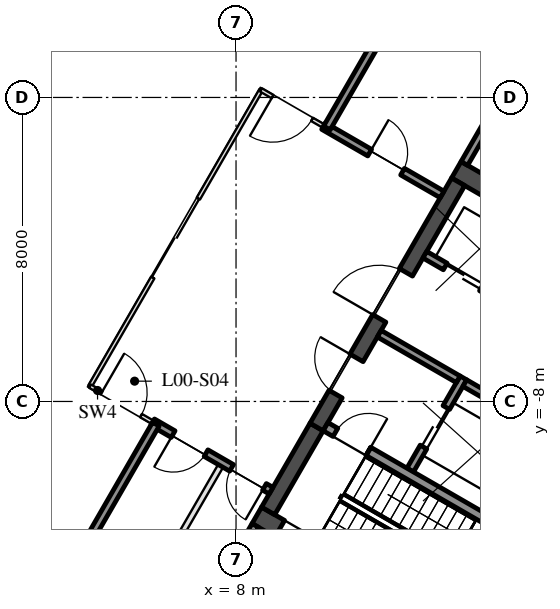
"""IFC4 building model, lengths in metres.
Left out: names, types, materials, properties, quantities, classifications, styles, units other than length and angle.
Written with IfcOpenShell. Run it as: python <this file> out.ifc"""

import sys

from ifc_helpers import new_model, si_unit, direction, frame, frame_2d, origin, origin_2d, place, context, subcontext, project, spatial, rectangle, extrude, element, fill, save


model = new_model("IFC4")
c1 = context("Model", 3, precision=1e-05, world=origin(), true_north=direction((0.0, 1.0)))
c2 = subcontext(c1, "Body", "Model", "MODEL_VIEW")
j1 = project(units=[si_unit("LENGTHUNIT", "METRE"), si_unit("PLANEANGLEUNIT", "RADIAN")], contexts=[c1])
p1 = place(None, origin())
s1 = spatial("IfcSite", under=j1, at=p1, CompositionType="ELEMENT")
p2 = place(p1, origin())
s2 = spatial("IfcBuilding", under=s1, at=p2, CompositionType="ELEMENT")
p3 = place(p2, origin())
s3 = spatial("IfcBuildingStorey", under=s2, at=p3, CompositionType="ELEMENT", Elevation=0.0)
p4 = place(p3, frame((13.797, -1.903, 0.0), z_axis=(0.0, 0.0, 1.0), x_axis=(0.866024264262, -0.500001973705, 0.0)))
e1 = element("IfcWall", 1, at=p4, inside=s3, PredefinedType="SHEAR", context=c2, shape_type="SweptSolid", body=[
    extrude(rectangle(XDim=15.6, YDim=0.5, at=frame_2d((7.8, 0.0))), origin(), (0.0, 0.0, 1.0), 8.7),
])
p5 = place(p3, frame((12.583, -9.805, 0.0), z_axis=(0.0, 0.0, 1.0), x_axis=(0.49994636267, 0.866056369097, 0.0)))
e2 = element("IfcWall", 2, at=p5, inside=s3, PredefinedType="SHEAR", context=c2, shape_type="SweptSolid", body=[
    extrude(rectangle(XDim=2.8, YDim=0.2, at=frame_2d((1.4, 0.0))), origin(), (0.0, 0.0, 1.0), 8.7),
])
p6 = place(p5, frame((0.7, 0.0, 0.0)))
e3 = element("IfcOpeningElement", 3, at=p6, cuts=e2, PredefinedType="OPENING", context=c2, shape_type="SweptSolid", body=[
    extrude(rectangle(XDim=1.2, YDim=2.1, at=frame_2d((0.6, 1.05))), frame((0.0, 0.11, 0.0), z_axis=(0.0, -1.0, 0.0), x_axis=(1.0, 0.0, 0.0)), (0.0, 0.0, 1.0), 0.22),
])
p7 = place(p3, frame((11.768, -6.217, 0.0), z_axis=(0.0, 0.0, 1.0), x_axis=(0.866050077142, -0.499957262057, 0.0)))
e4 = element("IfcWall", 4, at=p7, inside=s3, PredefinedType="SHEAR", context=c2, shape_type="SweptSolid", body=[
    extrude(rectangle(XDim=2.4, YDim=0.2, at=frame_2d((1.2, 0.0))), origin(), (0.0, 0.0, 1.0), 8.7),
])
p8 = place(p3, frame((14.02, -7.517, 0.0), z_axis=(0.0, 0.0, 1.0), x_axis=(0.866034573852, -0.49998411664, 0.0)))
e5 = element("IfcWall", 5, at=p8, inside=s3, PredefinedType="SHEAR", context=c2, shape_type="SweptSolid", body=[
    extrude(rectangle(XDim=2.8, YDim=0.2, at=frame_2d((1.4, 0.0))), origin(), (0.0, 0.0, 1.0), 8.7),
])
p9 = place(p3, frame((12.968, -4.138, 0.0), z_axis=(0.0, 0.0, 1.0), x_axis=(0.866028328073, -0.49999493495, 0.0)))
e6 = element("IfcWall", 6, at=p9, inside=s3, PredefinedType="SHEAR", context=c2, shape_type="SweptSolid", body=[
    extrude(rectangle(XDim=10.16, YDim=0.2, at=frame_2d((5.08, 0.0))), origin(), (0.0, 0.0, 1.0), 8.7),
])
p10 = place(p9, frame((0.62, 0.0, 0.0)))
e7 = element("IfcOpeningElement", 7, at=p10, cuts=e6, PredefinedType="OPENING", context=c2, shape_type="SweptSolid", body=[
    extrude(rectangle(XDim=1.1, YDim=2.1, at=frame_2d((0.55, 1.05))), frame((0.0, 0.11, 0.0), z_axis=(0.0, -1.0, 0.0), x_axis=(1.0, 0.0, 0.0)), (0.0, 0.0, 1.0), 0.22),
])
p11 = place(p9, frame((3.16, 0.0, 0.0)))
e8 = element("IfcOpeningElement", 8, at=p11, cuts=e6, PredefinedType="OPENING", context=c2, shape_type="SweptSolid", body=[
    extrude(rectangle(XDim=1.1, YDim=2.1, at=frame_2d((0.55, 1.05))), frame((0.0, 0.11, 0.0), z_axis=(0.0, -1.0, 0.0), x_axis=(1.0, 0.0, 0.0)), (0.0, 0.0, 1.0), 0.22),
])
p12 = place(p9, frame((5.7, 0.0, 0.0)))
e9 = element("IfcOpeningElement", 9, at=p12, cuts=e6, PredefinedType="OPENING", context=c2, shape_type="SweptSolid", body=[
    extrude(rectangle(XDim=1.1, YDim=2.1, at=frame_2d((0.55, 1.05))), frame((0.0, 0.11, 0.0), z_axis=(0.0, -1.0, 0.0), x_axis=(1.0, 0.0, 0.0)), (0.0, 0.0, 1.0), 0.22),
])
p13 = place(p9, frame((8.24, 0.0, 0.0)))
e10 = element("IfcOpeningElement", 10, at=p13, cuts=e6, PredefinedType="OPENING", context=c2, shape_type="SweptSolid", body=[
    extrude(rectangle(XDim=1.1, YDim=2.1, at=frame_2d((0.55, 1.05))), frame((0.0, 0.11, 0.0), z_axis=(0.0, -1.0, 0.0), x_axis=(1.0, 0.0, 0.0)), (0.0, 0.0, 1.0), 0.22),
])
p14 = place(p3, frame((8.547, -10.997, 0.0), z_axis=(0.0, 0.0, 1.0), x_axis=(0.866033076574, -0.499986710104, 0.0)))
e11 = element("IfcWall", 11, at=p14, inside=s3, PredefinedType="SHEAR", context=c2, shape_type="SweptSolid", body=[
    extrude(rectangle(XDim=1.706, YDim=0.5, at=frame_2d((0.853, 0.0))), origin(), (0.0, 0.0, 1.0), 8.7),
])
p15 = place(p14, frame((0.7, 0.0, 0.0)))
e12 = element("IfcOpeningElement", 12, at=p15, cuts=e11, PredefinedType="OPENING", context=c2, shape_type="SweptSolid", body=[
    extrude(rectangle(XDim=1.0, YDim=2.1, at=frame_2d((0.5, 1.05))), frame((0.0, 0.26, 0.0), z_axis=(0.0, -1.0, 0.0), x_axis=(1.0, 0.0, 0.0)), (0.0, 0.0, 1.0), 0.52),
])
p16 = place(p3, frame((8.845, -10.88, 0.0), z_axis=(0.0, 0.0, 1.0), x_axis=(0.499990435942, 0.866030925526, 0.0)))
e13 = element("IfcWall", 13, at=p16, inside=s3, PredefinedType="SHEAR", context=c2, shape_type="SweptSolid", body=[
    extrude(rectangle(XDim=2.55, YDim=0.4, at=frame_2d((1.275, 0.0))), origin(), (0.0, 0.0, 1.0), 8.7),
])
p17 = place(p3, frame((10.12, -8.672, 0.0), z_axis=(0.0, 0.0, 1.0), x_axis=(0.500008956979, 0.866020232408, 0.0)))
e14 = element("IfcWall", 14, at=p17, inside=s3, PredefinedType="SHEAR", context=c2, shape_type="SweptSolid", body=[
    extrude(rectangle(XDim=7.45, YDim=0.4, at=frame_2d((3.725, 0.0))), origin(), (0.0, 0.0, 1.0), 8.7),
])
p18 = place(p17, frame((1.0, 0.0, 0.0)))
e15 = element("IfcOpeningElement", 15, at=p18, cuts=e14, PredefinedType="OPENING", context=c2, shape_type="SweptSolid", body=[
    extrude(rectangle(XDim=1.1, YDim=2.1, at=frame_2d((0.55, 1.05))), frame((0.0, 0.21, 0.0), z_axis=(0.0, -1.0, 0.0), x_axis=(1.0, 0.0, 0.0)), (0.0, 0.0, 1.0), 0.42),
])
p19 = place(p17, frame((3.3, 0.0, 0.0)))
e16 = element("IfcOpeningElement", 16, at=p19, cuts=e14, PredefinedType="OPENING", context=c2, shape_type="SweptSolid", body=[
    extrude(rectangle(XDim=1.4, YDim=2.1, at=frame_2d((0.7, 1.05))), frame((0.0, 0.21, 0.0), z_axis=(0.0, -1.0, 0.0), x_axis=(1.0, 0.0, 0.0)), (0.0, 0.0, 1.0), 0.42),
])
p20 = place(p3, frame((10.356, -8.664, 0.0), z_axis=(0.0, 0.0, 1.0), x_axis=(0.866095317631, -0.499878886109, 0.0)))
e17 = element("IfcWall", 17, at=p20, inside=s3, PredefinedType="SHEAR", context=c2, shape_type="SweptSolid", body=[
    extrude(rectangle(XDim=1.306, YDim=0.25, at=frame_2d((0.653, 0.0))), origin(), (0.0, 0.0, 1.0), 8.7),
])
p21 = place(p20, frame((0.3, 0.0, 0.0)))
e18 = element("IfcOpeningElement", 18, at=p21, cuts=e17, PredefinedType="OPENING", context=c2, shape_type="SweptSolid", body=[
    extrude(rectangle(XDim=1.0, YDim=2.1, at=frame_2d((0.5, 1.05))), frame((0.0, 0.135, 0.0), z_axis=(0.0, -1.0, 0.0), x_axis=(1.0, 0.0, 0.0)), (0.0, 0.0, 1.0), 0.27),
])
p22 = place(p3, frame((11.487, -9.316, 0.0), z_axis=(0.0, 0.0, 1.0), x_axis=(0.866011695431, -0.500023742813, 0.0)))
e19 = element("IfcWall", 19, at=p22, inside=s3, PredefinedType="SHEAR", context=c2, shape_type="SweptSolid", body=[
    extrude(rectangle(XDim=5.144, YDim=0.25, at=frame_2d((2.572, 0.0))), origin(), (0.0, 0.0, 1.0), 8.7),
])
p23 = place(p3, frame((4.159, -7.597, 0.0), z_axis=(0.0, 0.0, 1.0), x_axis=(0.5000018851, 0.866024315419, 0.0)))
e20 = element("IfcWall", 20, at=p23, inside=s3, PredefinedType="PARTITIONING", context=c2, shape_type="SweptSolid", body=[
    extrude(rectangle(XDim=9.0, YDim=0.1, at=frame_2d((4.5, 0.0))), origin(), (0.0, 0.0, 1.0), 4.5),
])
p24 = place(p23, frame((3.3, 0.0, 0.0)))
e21 = element("IfcOpeningElement", 21, at=p24, cuts=e20, PredefinedType="OPENING", context=c2, shape_type="SweptSolid", body=[
    extrude(rectangle(XDim=2.4, YDim=2.4, at=frame_2d((1.2, 1.2))), frame((0.0, 0.06, 0.0), z_axis=(0.0, -1.0, 0.0), x_axis=(1.0, 0.0, 0.0)), (0.0, 0.0, 1.0), 0.12),
])
p25 = place(p3, frame((4.159, -7.597, 0.0), z_axis=(0.0, 0.0, 1.0), x_axis=(0.86601224135, -0.500022797313, 0.0)))
e22 = element("IfcWall", 22, at=p25, inside=s3, PredefinedType="PARTITIONING", context=c2, shape_type="SweptSolid", body=[
    extrude(rectangle(XDim=1.9, YDim=0.1, at=frame_2d((0.95, 0.0))), origin(), (0.0, 0.0, 1.0), 4.5),
])
p26 = place(p25, frame((0.35, 0.0, 0.0)))
e23 = element("IfcOpeningElement", 23, at=p26, cuts=e22, PredefinedType="OPENING", context=c2, shape_type="SweptSolid", body=[
    extrude(rectangle(XDim=1.2, YDim=2.4, at=frame_2d((0.6, 1.2))), frame((0.0, 0.06, 0.0), z_axis=(0.0, -1.0, 0.0), x_axis=(1.0, 0.0, 0.0)), (0.0, 0.0, 1.0), 0.12),
])
p27 = place(p3, frame((5.804, -8.547, 0.0), z_axis=(0.0, 0.0, 1.0), x_axis=(0.866018442252, -0.500012057535, 0.0)))
e24 = element("IfcWall", 24, at=p27, inside=s3, PredefinedType="SOLIDWALL", context=c2, shape_type="SweptSolid", body=[
    extrude(rectangle(XDim=3.6, YDim=0.2, at=frame_2d((1.8, 0.0))), origin(), (0.0, 0.0, 1.0), 4.5),
])
p28 = place(p27, frame((0.625, 0.0, 0.0)))
e25 = element("IfcOpeningElement", 25, at=p28, cuts=e24, PredefinedType="OPENING", context=c2, shape_type="SweptSolid", body=[
    extrude(rectangle(XDim=1.0, YDim=2.1, at=frame_2d((0.5, 1.05))), frame((0.0, 0.11, 0.0), z_axis=(0.0, -1.0, 0.0), x_axis=(1.0, 0.0, 0.0)), (0.0, 0.0, 1.0), 0.22),
])
p29 = place(p27, frame((2.4, 0.0, 0.0)))
e26 = element("IfcOpeningElement", 26, at=p29, cuts=e24, PredefinedType="OPENING", context=c2, shape_type="SweptSolid", body=[
    extrude(rectangle(XDim=1.0, YDim=2.1, at=frame_2d((0.5, 1.05))), frame((0.0, 0.11, 0.0), z_axis=(0.0, -1.0, 0.0), x_axis=(1.0, 0.0, 0.0)), (0.0, 0.0, 1.0), 0.22),
])
p30 = place(p3, frame((8.508, -11.263, 0.0), z_axis=(0.0, 0.0, 1.0), x_axis=(-0.50002537861, -0.866010750942, 0.0)))
e27 = element("IfcWall", 27, at=p30, inside=s3, PredefinedType="SOLIDWALL", context=c2, shape_type="SweptSolid", body=[
    extrude(rectangle(XDim=3.0, YDim=0.2, at=frame_2d((1.5, 0.0))), origin(), (0.0, 0.0, 1.0), 4.5),
])
p31 = place(p3, frame((5.891, -8.597, 0.0), z_axis=(0.0, 0.0, 1.0), x_axis=(-0.49999894854, -0.866026010844, 0.0)))
e28 = element("IfcWall", 28, at=p31, inside=s3, PredefinedType="SOLIDWALL", context=c2, shape_type="SweptSolid", body=[
    extrude(rectangle(XDim=4.0, YDim=0.2, at=frame_2d((2.0, 0.0))), origin(), (0.0, 0.0, 1.0), 4.5),
])
p32 = place(p3, frame((7.594, -9.696, 0.0), z_axis=(0.0, 0.0, 1.0), x_axis=(-0.499992827086, -0.866029545028, 0.0)))
e29 = element("IfcWall", 29, at=p32, inside=s3, PredefinedType="PARTITIONING", context=c2, shape_type="SweptSolid", body=[
    extrude(rectangle(XDim=3.7, YDim=0.15, at=frame_2d((1.85, 0.0))), origin(), (0.0, 0.0, 1.0), 4.5),
])
p33 = place(p3, frame((8.659, 0.197, 0.0), z_axis=(0.0, 0.0, 1.0), x_axis=(0.86601224135, -0.500022797313, 0.0)))
e30 = element("IfcWall", 30, at=p33, inside=s3, PredefinedType="PARTITIONING", context=c2, shape_type="SweptSolid", body=[
    extrude(rectangle(XDim=1.9, YDim=0.1, at=frame_2d((0.95, 0.0))), origin(), (0.0, 0.0, 1.0), 4.5),
])
p34 = place(p33, frame((0.35, 0.0, 0.0)))
e31 = element("IfcOpeningElement", 31, at=p34, cuts=e30, PredefinedType="OPENING", context=c2, shape_type="SweptSolid", body=[
    extrude(rectangle(XDim=1.2, YDim=2.4, at=frame_2d((0.6, 1.2))), frame((0.0, 0.06, 0.0), z_axis=(0.0, -1.0, 0.0), x_axis=(1.0, 0.0, 0.0)), (0.0, 0.0, 1.0), 0.12),
])
p35 = place(p3, frame((10.304, -0.753, 0.0), z_axis=(0.0, 0.0, 1.0), x_axis=(0.866018442252, -0.500012057535, 0.0)))
e32 = element("IfcWall", 32, at=p35, inside=s3, PredefinedType="SOLIDWALL", context=c2, shape_type="SweptSolid", body=[
    extrude(rectangle(XDim=3.6, YDim=0.2, at=frame_2d((1.8, 0.0))), origin(), (0.0, 0.0, 1.0), 4.5),
])
p36 = place(p35, frame((1.4, 0.0, 0.0)))
e33 = element("IfcOpeningElement", 33, at=p36, cuts=e32, PredefinedType="OPENING", context=c2, shape_type="SweptSolid", body=[
    extrude(rectangle(XDim=1.0, YDim=2.1, at=frame_2d((0.5, 1.05))), frame((0.0, 0.11, 0.0), z_axis=(0.0, -1.0, 0.0), x_axis=(1.0, 0.0, 0.0)), (0.0, 0.0, 1.0), 0.22),
])
p37 = place(p3, frame((14.008, -1.737, 0.0), z_axis=(0.0, 0.0, 1.0), x_axis=(0.50002537861, 0.866010750942, 0.0)))
e34 = element("IfcWall", 34, at=p37, inside=s3, PredefinedType="SOLIDWALL", context=c2, shape_type="SweptSolid", body=[
    extrude(rectangle(XDim=3.0, YDim=0.2, at=frame_2d((1.5, 0.0))), origin(), (0.0, 0.0, 1.0), 4.5),
])
p38 = place(p3, frame((10.391, -0.803, 0.0), z_axis=(0.0, 0.0, 1.0), x_axis=(0.49999894854, 0.866026010844, 0.0)))
e35 = element("IfcWall", 35, at=p38, inside=s3, PredefinedType="SOLIDWALL", context=c2, shape_type="SweptSolid", body=[
    extrude(rectangle(XDim=4.0, YDim=0.2, at=frame_2d((2.0, 0.0))), origin(), (0.0, 0.0, 1.0), 4.5),
])
p39 = place(p3, frame((12.254, 2.625, 0.0), z_axis=(0.0, 0.0, 1.0), x_axis=(0.866047807691, -0.499961193289, 0.0)))
e36 = element("IfcWall", 36, at=p39, inside=s3, PredefinedType="SOLIDWALL", context=c2, shape_type="SweptSolid", body=[
    extrude(rectangle(XDim=3.6, YDim=0.2, at=frame_2d((1.8, 0.0))), origin(), (0.0, 0.0, 1.0), 4.5),
])
for number, where, z_axis, x_axis in (
    (37, (2.945, 1.7, 0.0), (0.0, 0.0, 1.0), (-0.5, 0.866, 0.0)),
    (38, (2.945, -1.7, 0.0), (0.0, 0.0, 1.0), (0.5, 0.866, 0.0)),
):
    element("IfcWall", number, at=place(p3, frame(where, z_axis=z_axis, x_axis=x_axis)), inside=s3, PredefinedType="SOLIDWALL", context=c2, shape_type="SweptSolid", body=[
        extrude(rectangle(XDim=3.0, YDim=1.2, at=origin_2d()), origin(), (0.0, 0.0, 1.0), 0.6),
    ])
p40 = place(p6, origin())
e39 = element("IfcDoor", 39, at=p40, inside=s3, OperationType="DOUBLE_DOOR_SLIDING", PredefinedType="DOOR", context=c2, shape_type="SweptSolid", body=[
    extrude(rectangle(XDim=1.2, YDim=2.1, at=frame_2d((0.6, 1.05))), frame((0.0, 0.025, 0.0), z_axis=(0.0, -1.0, 0.0), x_axis=(1.0, 0.0, 0.0)), (0.0, 0.0, 1.0), 0.05),
])
fill(e3, e39)
p41 = place(p10, origin())
e40 = element("IfcDoor", 40, at=p41, inside=s3, OperationType="DOUBLE_DOOR_SLIDING", PredefinedType="DOOR", context=c2, shape_type="SweptSolid", body=[
    extrude(rectangle(XDim=1.1, YDim=2.1, at=frame_2d((0.55, 1.05))), frame((0.0, 0.025, 0.0), z_axis=(0.0, -1.0, 0.0), x_axis=(1.0, 0.0, 0.0)), (0.0, 0.0, 1.0), 0.05),
])
fill(e7, e40)
p42 = place(p18, origin())
e41 = element("IfcDoor", 41, at=p42, inside=s3, OperationType="SINGLE_SWING_RIGHT", PredefinedType="DOOR", context=c2, shape_type="SweptSolid", body=[
    extrude(rectangle(XDim=1.1, YDim=2.1, at=frame_2d((0.55, 1.05))), frame((0.0, 0.025, 0.0), z_axis=(0.0, -1.0, 0.0), x_axis=(1.0, 0.0, 0.0)), (0.0, 0.0, 1.0), 0.05),
])
fill(e15, e41)
p43 = place(p19, origin())
e42 = element("IfcDoor", 42, at=p43, inside=s3, OperationType="DOUBLE_DOOR_SINGLE_SWING", PredefinedType="DOOR", context=c2, shape_type="SweptSolid", body=[
    extrude(rectangle(XDim=1.4, YDim=2.1, at=frame_2d((0.7, 1.05))), frame((0.0, 0.025, 0.0), z_axis=(0.0, -1.0, 0.0), x_axis=(1.0, 0.0, 0.0)), (0.0, 0.0, 1.0), 0.05),
])
fill(e16, e42)
p44 = place(p21, origin())
e43 = element("IfcDoor", 43, at=p44, inside=s3, OperationType="SINGLE_SWING_RIGHT", PredefinedType="DOOR", context=c2, shape_type="SweptSolid", body=[
    extrude(rectangle(XDim=1.0, YDim=2.1, at=frame_2d((0.5, 1.05))), frame((0.0, 0.025, 0.0), z_axis=(0.0, -1.0, 0.0), x_axis=(1.0, 0.0, 0.0)), (0.0, 0.0, 1.0), 0.05),
])
fill(e18, e43)
p45 = place(p15, frame((1.0, 0.0, 0.0), z_axis=(0.0, 0.0, 1.0), x_axis=(-1.0, 0.0, 0.0)))
e44 = element("IfcDoor", 44, at=p45, inside=s3, OperationType="SINGLE_SWING_LEFT", PredefinedType="DOOR", context=c2, shape_type="SweptSolid", body=[
    extrude(rectangle(XDim=1.0, YDim=2.1, at=frame_2d((0.5, 1.05))), frame((0.0, 0.025, 0.0), z_axis=(0.0, -1.0, 0.0), x_axis=(1.0, 0.0, 0.0)), (0.0, 0.0, 1.0), 0.05),
])
fill(e12, e44)
p46 = place(p24, origin())
e45 = element("IfcDoor", 45, at=p46, inside=s3, OperationType="DOUBLE_DOOR_SLIDING", PredefinedType="DOOR", context=c2, shape_type="SweptSolid", body=[
    extrude(rectangle(XDim=2.4, YDim=2.4, at=frame_2d((1.2, 1.2))), frame((0.0, 0.025, 0.0), z_axis=(0.0, -1.0, 0.0), x_axis=(1.0, 0.0, 0.0)), (0.0, 0.0, 1.0), 0.05),
])
fill(e21, e45)
p47 = place(p26, origin())
e46 = element("IfcDoor", 46, at=p47, inside=s3, OperationType="SINGLE_SWING_LEFT", PredefinedType="DOOR", context=c2, shape_type="SweptSolid", body=[
    extrude(rectangle(XDim=1.2, YDim=2.4, at=frame_2d((0.6, 1.2))), frame((0.0, 0.025, 0.0), z_axis=(0.0, -1.0, 0.0), x_axis=(1.0, 0.0, 0.0)), (0.0, 0.0, 1.0), 0.05),
])
fill(e23, e46)
p48 = place(p28, frame((1.0, 0.0, 0.0), z_axis=(0.0, 0.0, 1.0), x_axis=(-1.0, 0.0, 0.0)))
e47 = element("IfcDoor", 47, at=p48, inside=s3, OperationType="SINGLE_SWING_RIGHT", PredefinedType="DOOR", context=c2, shape_type="SweptSolid", body=[
    extrude(rectangle(XDim=1.0, YDim=2.1, at=frame_2d((0.5, 1.05))), frame((0.0, 0.025, 0.0), z_axis=(0.0, -1.0, 0.0), x_axis=(1.0, 0.0, 0.0)), (0.0, 0.0, 1.0), 0.05),
])
fill(e25, e47)
p49 = place(p29, frame((1.0, 0.0, 0.0), z_axis=(0.0, 0.0, 1.0), x_axis=(-1.0, 0.0, 0.0)))
e48 = element("IfcDoor", 48, at=p49, inside=s3, OperationType="SINGLE_SWING_LEFT", PredefinedType="DOOR", context=c2, shape_type="SweptSolid", body=[
    extrude(rectangle(XDim=1.0, YDim=2.1, at=frame_2d((0.5, 1.05))), frame((0.0, 0.025, 0.0), z_axis=(0.0, -1.0, 0.0), x_axis=(1.0, 0.0, 0.0)), (0.0, 0.0, 1.0), 0.05),
])
fill(e26, e48)
p50 = place(p34, frame((1.2, 0.0, 0.0), z_axis=(0.0, 0.0, 1.0), x_axis=(-1.0, 0.0, 0.0)))
e49 = element("IfcDoor", 49, at=p50, inside=s3, OperationType="SINGLE_SWING_RIGHT", PredefinedType="DOOR", context=c2, shape_type="SweptSolid", body=[
    extrude(rectangle(XDim=1.2, YDim=2.4, at=frame_2d((0.6, 1.2))), frame((0.0, 0.025, 0.0), z_axis=(0.0, -1.0, 0.0), x_axis=(1.0, 0.0, 0.0)), (0.0, 0.0, 1.0), 0.05),
])
fill(e31, e49)
p51 = place(p36, origin())
e50 = element("IfcDoor", 50, at=p51, inside=s3, OperationType="SINGLE_SWING_LEFT", PredefinedType="DOOR", context=c2, shape_type="SweptSolid", body=[
    extrude(rectangle(XDim=1.0, YDim=2.1, at=frame_2d((0.5, 1.05))), frame((0.0, 0.025, 0.0), z_axis=(0.0, -1.0, 0.0), x_axis=(1.0, 0.0, 0.0)), (0.0, 0.0, 1.0), 0.05),
])
fill(e33, e50)
save(model, sys.argv[1])
